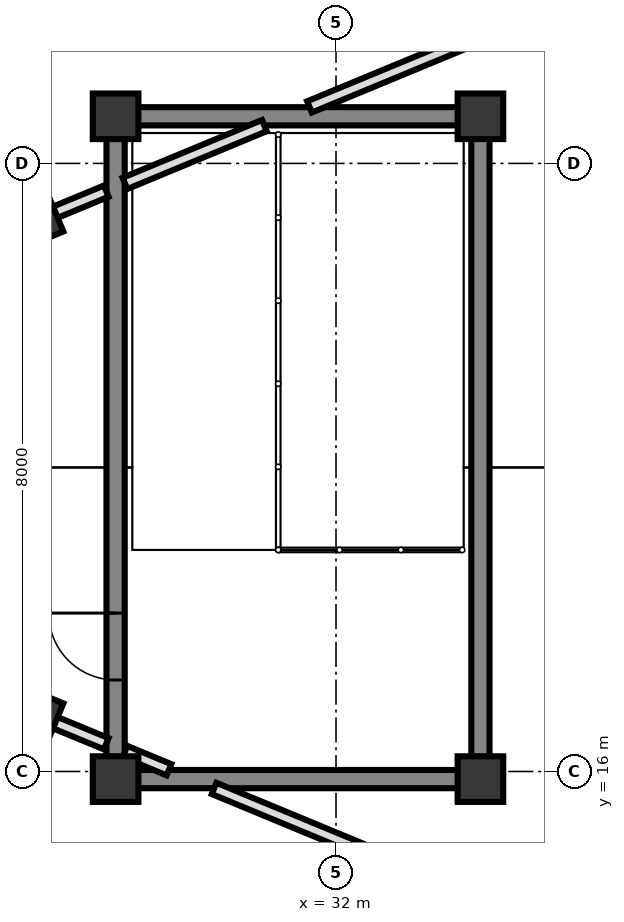
"""IFC4 building model, lengths in metres.
Left out: names, types, materials, properties, quantities, classifications, styles, units other than length and angle.
Written with IfcOpenShell. Run it as: python <this file> out.ifc"""

import sys

from ifc_helpers import new_model, si_unit, direction, frame, frame_2d, origin, origin_2d, place, context, subcontext, project, spatial, rectangle, extrude, element, fill, save


model = new_model("IFC4")
c1 = context("Model", 3, precision=1e-05, world=origin(), true_north=direction((0.0, 1.0)))
c2 = subcontext(c1, "Body", "Model", "MODEL_VIEW")
j1 = project(units=[si_unit("LENGTHUNIT", "METRE"), si_unit("PLANEANGLEUNIT", "RADIAN")], contexts=[c1])
p1 = place(None, origin())
s1 = spatial("IfcSite", under=j1, at=p1, CompositionType="ELEMENT")
p2 = place(p1, origin())
s2 = spatial("IfcBuilding", under=s1, at=p2, CompositionType="ELEMENT")
p3 = place(p2, frame((0.0, 0.0, 12.5)))
s3 = spatial("IfcBuildingStorey", under=s2, at=p3, CompositionType="ELEMENT", Elevation=12.5)
for number, where, z_axis, x_axis in (
    (1, (29.1, 15.9, 0.0), (0.0, 0.0, 1.0), (1.0, 0.0, 0.0)),
    (2, (33.9, 15.9, 0.0), (0.0, 0.0, 1.0), (1.0, 0.0, 0.0)),
    (3, (33.9, 24.62, 0.0), (0.0, 0.0, 1.0), (1.0, 0.0, 0.0)),
    (4, (29.1, 24.62, 0.0), (0.0, 0.0, 1.0), (1.0, 0.0, 0.0)),
):
    element("IfcColumn", number, at=place(p3, frame(where, z_axis=z_axis, x_axis=x_axis)), inside=s3, PredefinedType="COLUMN", context=c2, shape_type="SweptSolid", body=[
        extrude(rectangle(XDim=0.6, YDim=0.6, at=origin_2d()), origin(), (0.0, 0.0, 1.0), 4.0),
    ])
for number, where, z_axis, x_axis in (
    (5, (28.053, 23.253, 0.0), (0.0, 0.0, 1.0), (0.924, 0.383, 0.0)),
    (6, (28.053, 16.747, 0.0), (0.0, 0.0, 1.0), (0.924, -0.383, 0.0)),
):
    element("IfcColumn", number, at=place(p3, frame(where, z_axis=z_axis, x_axis=x_axis)), inside=s3, PredefinedType="COLUMN", context=c2, shape_type="SweptSolid", body=[
        extrude(rectangle(XDim=0.55, YDim=0.55, at=origin_2d()), origin(), (0.0, 0.0, 1.0), 4.59),
    ])
p4 = place(p3, frame((29.1, 16.192, 0.0), z_axis=(0.0, 0.0, 1.0), x_axis=(0.0, 1.0, 0.0)))
e7 = element("IfcWall", 7, at=p4, inside=s3, PredefinedType="SHEAR", context=c2, shape_type="SweptSolid", body=[
    extrude(rectangle(XDim=8.136, YDim=0.24, at=frame_2d((4.068, 0.0))), origin(), (0.0, 0.0, 1.0), 3.74),
])
p5 = place(p4, frame((1.012, 0.0, 0.0)))
e8 = element("IfcOpeningElement", 8, at=p5, cuts=e7, PredefinedType="OPENING", context=c2, shape_type="SweptSolid", body=[
    extrude(rectangle(XDim=0.88, YDim=2.1, at=frame_2d((0.44, 1.05))), frame((0.0, 0.13, 0.0), z_axis=(0.0, -1.0, 0.0), x_axis=(1.0, 0.0, 0.0)), (0.0, 0.0, 1.0), 0.26),
])
p6 = place(p3, frame((33.9, 24.328, 0.0), z_axis=(0.0, 0.0, 1.0), x_axis=(0.0, -1.0, 0.0)))
e9 = element("IfcWall", 9, at=p6, inside=s3, PredefinedType="SHEAR", context=c2, shape_type="SweptSolid", body=[
    extrude(rectangle(XDim=8.136, YDim=0.24, at=frame_2d((4.068, 0.0))), origin(), (0.0, 0.0, 1.0), 3.74),
])
for number, where, z_axis, x_axis in (
    (10, (33.608, 15.9, 0.0), (0.0, 0.0, 1.0), (-1.0, 0.0, 0.0)),
    (11, (33.608, 24.62, 0.0), (0.0, 0.0, 1.0), (-1.0, 0.0, 0.0)),
):
    element("IfcWall", number, at=place(p3, frame(where, z_axis=z_axis, x_axis=x_axis)), inside=s3, PredefinedType="SHEAR", context=c2, shape_type="SweptSolid", body=[
        extrude(rectangle(XDim=4.216, YDim=0.24, at=frame_2d((2.108, 0.0))), origin(), (0.0, 0.0, 1.0), 3.74),
    ])
p7 = place(p3, frame((28.3, 23.355, 0.0), z_axis=(0.0, 0.0, 1.0), x_axis=(0.924069600435, 0.382224245113, 0.0)))
e12 = element("IfcWall", 12, at=p7, inside=s3, PredefinedType="PARTITIONING", context=c2, shape_type="SweptSolid", body=[
    extrude(rectangle(XDim=0.733, YDim=0.16, at=frame_2d((0.366, 0.0))), origin(), (0.0, 0.0, 1.0), 3.7),
])
p8 = place(p3, frame((29.223, 23.737, 0.0), z_axis=(0.0, 0.0, 1.0), x_axis=(0.923817443679, 0.382833293686, 0.0)))
e13 = element("IfcWall", 13, at=p8, inside=s3, PredefinedType="PARTITIONING", context=c2, shape_type="SweptSolid", body=[
    extrude(rectangle(XDim=1.985, YDim=0.16, at=frame_2d((0.993, 0.0))), origin(), (0.0, 0.0, 1.0), 3.7),
])
p9 = place(p3, frame((31.651, 24.743, 0.0), z_axis=(0.0, 0.0, 1.0), x_axis=(0.923877739946, 0.382687759972, 0.0)))
e14 = element("IfcWall", 14, at=p9, inside=s3, PredefinedType="PARTITIONING", context=c2, shape_type="SweptSolid", body=[
    extrude(rectangle(XDim=4.813, YDim=0.16, at=frame_2d((2.407, 0.0))), origin(), (0.0, 0.0, 1.0), 3.7),
])
p10 = place(p3, frame((28.3, 16.645, 0.0), z_axis=(0.0, 0.0, 1.0), x_axis=(0.924069600435, -0.382224245113, 0.0)))
e15 = element("IfcWall", 15, at=p10, inside=s3, PredefinedType="PARTITIONING", context=c2, shape_type="SweptSolid", body=[
    extrude(rectangle(XDim=0.733, YDim=0.16, at=frame_2d((0.366, 0.0))), origin(), (0.0, 0.0, 1.0), 3.7),
])
p11 = place(p3, frame((29.223, 16.263, 0.0), z_axis=(0.0, 0.0, 1.0), x_axis=(0.923812676193, -0.382844797933, 0.0)))
e16 = element("IfcWall", 16, at=p11, inside=s3, PredefinedType="PARTITIONING", context=c2, shape_type="SweptSolid", body=[
    extrude(rectangle(XDim=0.627, YDim=0.16, at=frame_2d((0.313, 0.0))), origin(), (0.0, 0.0, 1.0), 3.7),
])
p12 = place(p3, frame((30.396, 15.777, 0.0), z_axis=(0.0, 0.0, 1.0), x_axis=(0.923864955254, -0.382718623082, 0.0)))
e17 = element("IfcWall", 17, at=p12, inside=s3, PredefinedType="PARTITIONING", context=c2, shape_type="SweptSolid", body=[
    extrude(rectangle(XDim=6.172, YDim=0.16, at=frame_2d((3.086, 0.0))), origin(), (0.0, 0.0, 1.0), 3.7),
])
p13 = place(p5, origin())
e18 = element("IfcDoor", 18, at=p13, inside=s3, OperationType="SINGLE_SWING_RIGHT", PredefinedType="DOOR", context=c2, shape_type="SweptSolid", body=[
    extrude(rectangle(XDim=0.88, YDim=2.1, at=frame_2d((0.44, 1.05))), frame((0.0, 0.025, 0.0), z_axis=(0.0, -1.0, 0.0), x_axis=(1.0, 0.0, 0.0)), (0.0, 0.0, 1.0), 0.05),
])
fill(e8, e18)
save(model, sys.argv[1])
